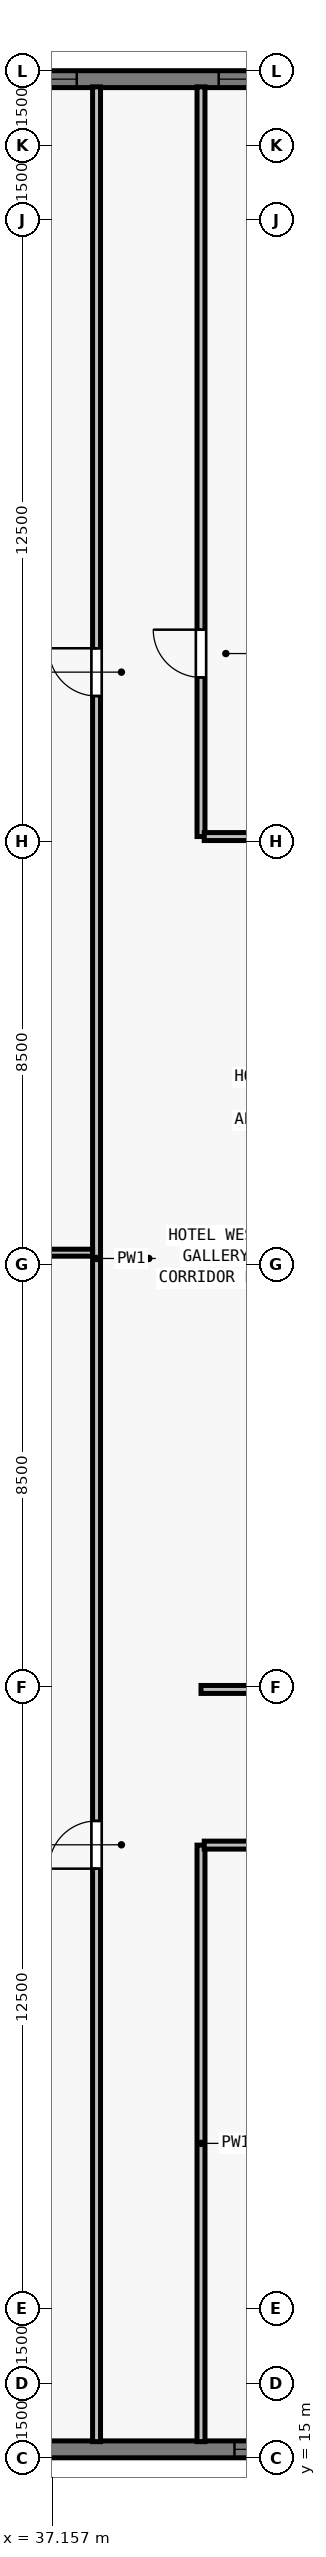
"""IFC4 building model, lengths in metres.
Left out: names, types, materials, properties, quantities, classifications, styles, units other than length and angle.
Written with IfcOpenShell. Run it as: python <this file> out.ifc"""

import sys

from ifc_helpers import new_model, si_unit, direction, frame, frame_2d, origin, place, context, subcontext, project, spatial, rectangle, extrude, element, fill, save


model = new_model("IFC4")
c1 = context("Model", 3, precision=1e-05, world=origin(), true_north=direction((0.0, 1.0)))
c2 = subcontext(c1, "Body", "Model", "MODEL_VIEW")
j1 = project(units=[si_unit("LENGTHUNIT", "METRE"), si_unit("PLANEANGLEUNIT", "RADIAN")], contexts=[c1])
p1 = place(None, origin())
s1 = spatial("IfcSite", under=j1, at=p1, CompositionType="ELEMENT")
p2 = place(p1, origin())
s2 = spatial("IfcBuilding", under=s1, at=p2, CompositionType="ELEMENT")
p3 = place(p2, frame((0.0, 0.0, 186.5)))
s3 = spatial("IfcBuildingStorey", under=s2, at=p3, CompositionType="ELEMENT", Elevation=186.5)
p4 = place(p3, frame((72.0, 15.17, 0.0), z_axis=(0.0, 0.0, 1.0), x_axis=(-1.0, 0.0, 0.0)))
e1 = element("IfcWall", 1, at=p4, inside=s3, PredefinedType="SOLIDWALL", context=c2, shape_type="SweptSolid", body=[
    extrude(rectangle(XDim=39.682, YDim=0.34, at=frame_2d((19.841, 0.0))), origin(), (0.0, 0.0, 1.0), 3.28),
])
p5 = place(p4, frame((11.859, 0.0, 0.8)))
e2 = element("IfcOpeningElement", 2, at=p5, cuts=e1, PredefinedType="OPENING", context=c2, shape_type="SweptSolid", body=[
    extrude(rectangle(XDim=1.75, YDim=1.66, at=frame_2d((0.875, 0.83))), frame((0.0, 0.18, 0.0), z_axis=(0.0, -1.0, 0.0), x_axis=(1.0, 0.0, 0.0)), (0.0, 0.0, 1.0), 0.36),
])
p6 = place(p4, frame((18.966, 0.0, 0.8)))
e3 = element("IfcOpeningElement", 3, at=p6, cuts=e1, PredefinedType="OPENING", context=c2, shape_type="SweptSolid", body=[
    extrude(rectangle(XDim=1.75, YDim=1.66, at=frame_2d((0.875, 0.83))), frame((0.0, 0.18, 0.0), z_axis=(0.0, -1.0, 0.0), x_axis=(1.0, 0.0, 0.0)), (0.0, 0.0, 1.0), 0.36),
])
p7 = place(p4, frame((22.27, 0.0, 0.8)))
e4 = element("IfcOpeningElement", 4, at=p7, cuts=e1, PredefinedType="OPENING", context=c2, shape_type="SweptSolid", body=[
    extrude(rectangle(XDim=1.35, YDim=1.66, at=frame_2d((0.675, 0.83))), frame((0.0, 0.18, 0.0), z_axis=(0.0, -1.0, 0.0), x_axis=(1.0, 0.0, 0.0)), (0.0, 0.0, 1.0), 0.36),
])
p8 = place(p4, frame((26.073, 0.0, 0.8)))
e5 = element("IfcOpeningElement", 5, at=p8, cuts=e1, PredefinedType="OPENING", context=c2, shape_type="SweptSolid", body=[
    extrude(rectangle(XDim=1.75, YDim=1.66, at=frame_2d((0.875, 0.83))), frame((0.0, 0.18, 0.0), z_axis=(0.0, -1.0, 0.0), x_axis=(1.0, 0.0, 0.0)), (0.0, 0.0, 1.0), 0.36),
])
p9 = place(p4, frame((29.827, 0.0, 0.8)))
e6 = element("IfcOpeningElement", 6, at=p9, cuts=e1, PredefinedType="OPENING", context=c2, shape_type="SweptSolid", body=[
    extrude(rectangle(XDim=1.35, YDim=1.66, at=frame_2d((0.675, 0.83))), frame((0.0, 0.18, 0.0), z_axis=(0.0, -1.0, 0.0), x_axis=(1.0, 0.0, 0.0)), (0.0, 0.0, 1.0), 0.36),
])
p10 = place(p3, frame((32.0, 62.83, 0.0), z_axis=(0.0, 0.0, 1.0), x_axis=(1.0, 0.0, 0.0)))
e7 = element("IfcWall", 7, at=p10, inside=s3, PredefinedType="SOLIDWALL", context=c2, shape_type="SweptSolid", body=[
    extrude(rectangle(XDim=39.682, YDim=0.34, at=frame_2d((19.841, 0.0))), origin(), (0.0, 0.0, 1.0), 3.28),
])
p11 = place(p10, frame((3.902, 0.0, 0.8)))
e8 = element("IfcOpeningElement", 8, at=p11, cuts=e7, PredefinedType="OPENING", context=c2, shape_type="SweptSolid", body=[
    extrude(rectangle(XDim=1.75, YDim=1.66, at=frame_2d((0.875, 0.83))), frame((0.0, 0.18, 0.0), z_axis=(0.0, -1.0, 0.0), x_axis=(1.0, 0.0, 0.0)), (0.0, 0.0, 1.0), 0.36),
])
p12 = place(p10, frame((8.505, 0.0, 0.8)))
e9 = element("IfcOpeningElement", 9, at=p12, cuts=e7, PredefinedType="OPENING", context=c2, shape_type="SweptSolid", body=[
    extrude(rectangle(XDim=1.35, YDim=1.66, at=frame_2d((0.675, 0.83))), frame((0.0, 0.18, 0.0), z_axis=(0.0, -1.0, 0.0), x_axis=(1.0, 0.0, 0.0)), (0.0, 0.0, 1.0), 0.36),
])
p13 = place(p10, frame((11.859, 0.0, 0.8)))
e10 = element("IfcOpeningElement", 10, at=p13, cuts=e7, PredefinedType="OPENING", context=c2, shape_type="SweptSolid", body=[
    extrude(rectangle(XDim=1.75, YDim=1.66, at=frame_2d((0.875, 0.83))), frame((0.0, 0.18, 0.0), z_axis=(0.0, -1.0, 0.0), x_axis=(1.0, 0.0, 0.0)), (0.0, 0.0, 1.0), 0.36),
])
p14 = place(p10, frame((16.062, 0.0, 0.8)))
e11 = element("IfcOpeningElement", 11, at=p14, cuts=e7, PredefinedType="OPENING", context=c2, shape_type="SweptSolid", body=[
    extrude(rectangle(XDim=1.35, YDim=1.66, at=frame_2d((0.675, 0.83))), frame((0.0, 0.18, 0.0), z_axis=(0.0, -1.0, 0.0), x_axis=(1.0, 0.0, 0.0)), (0.0, 0.0, 1.0), 0.36),
])
p15 = place(p10, frame((17.716, 0.0, 0.8)))
e12 = element("IfcOpeningElement", 12, at=p15, cuts=e7, PredefinedType="OPENING", context=c2, shape_type="SweptSolid", body=[
    extrude(rectangle(XDim=1.75, YDim=1.66, at=frame_2d((0.875, 0.83))), frame((0.0, 0.18, 0.0), z_axis=(0.0, -1.0, 0.0), x_axis=(1.0, 0.0, 0.0)), (0.0, 0.0, 1.0), 0.36),
])
p16 = place(p10, frame((22.719, 0.0, 0.8)))
e13 = element("IfcOpeningElement", 13, at=p16, cuts=e7, PredefinedType="OPENING", context=c2, shape_type="SweptSolid", body=[
    extrude(rectangle(XDim=1.35, YDim=1.66, at=frame_2d((0.675, 0.83))), frame((0.0, 0.18, 0.0), z_axis=(0.0, -1.0, 0.0), x_axis=(1.0, 0.0, 0.0)), (0.0, 0.0, 1.0), 0.36),
])
p17 = place(p10, frame((26.073, 0.0, 0.8)))
e14 = element("IfcOpeningElement", 14, at=p17, cuts=e7, PredefinedType="OPENING", context=c2, shape_type="SweptSolid", body=[
    extrude(rectangle(XDim=1.75, YDim=1.66, at=frame_2d((0.875, 0.83))), frame((0.0, 0.18, 0.0), z_axis=(0.0, -1.0, 0.0), x_axis=(1.0, 0.0, 0.0)), (0.0, 0.0, 1.0), 0.36),
])
p18 = place(p10, frame((30.677, 0.0, 0.8)))
e15 = element("IfcOpeningElement", 15, at=p18, cuts=e7, PredefinedType="OPENING", context=c2, shape_type="SweptSolid", body=[
    extrude(rectangle(XDim=1.35, YDim=1.66, at=frame_2d((0.675, 0.83))), frame((0.0, 0.18, 0.0), z_axis=(0.0, -1.0, 0.0), x_axis=(1.0, 0.0, 0.0)), (0.0, 0.0, 1.0), 0.36),
])
p19 = place(p10, frame((33.18, 0.0, 0.8)))
e16 = element("IfcOpeningElement", 16, at=p19, cuts=e7, PredefinedType="OPENING", context=c2, shape_type="SweptSolid", body=[
    extrude(rectangle(XDim=1.75, YDim=1.66, at=frame_2d((0.875, 0.83))), frame((0.0, 0.18, 0.0), z_axis=(0.0, -1.0, 0.0), x_axis=(1.0, 0.0, 0.0)), (0.0, 0.0, 1.0), 0.36),
])
p20 = place(p3, frame((38.05, 15.325, 0.0), z_axis=(0.0, 0.0, 1.0), x_axis=(0.0, 1.0, 0.0)))
e17 = element("IfcWall", 17, at=p20, inside=s3, PredefinedType="PARTITIONING", context=c2, shape_type="SweptSolid", body=[
    extrude(rectangle(XDim=47.35, YDim=0.16, at=frame_2d((23.675, 0.0))), origin(), (0.0, 0.0, 1.0), 2.555),
])
p21 = place(p20, frame((11.521, 0.0, 0.0)))
e18 = element("IfcOpeningElement", 18, at=p21, cuts=e17, PredefinedType="OPENING", context=c2, shape_type="SweptSolid", body=[
    extrude(rectangle(XDim=0.96, YDim=2.12, at=frame_2d((0.48, 1.06))), frame((0.0, 0.09, 0.0), z_axis=(0.0, -1.0, 0.0), x_axis=(1.0, 0.0, 0.0)), (0.0, 0.0, 1.0), 0.18),
])
p22 = place(p20, frame((35.101, 0.0, 0.0)))
e19 = element("IfcOpeningElement", 19, at=p22, cuts=e17, PredefinedType="OPENING", context=c2, shape_type="SweptSolid", body=[
    extrude(rectangle(XDim=0.96, YDim=2.12, at=frame_2d((0.48, 1.06))), frame((0.0, 0.09, 0.0), z_axis=(0.0, -1.0, 0.0), x_axis=(1.0, 0.0, 0.0)), (0.0, 0.0, 1.0), 0.18),
])
p23 = place(p3, frame((40.15, 15.325, 0.0), z_axis=(0.0, 0.0, 1.0), x_axis=(0.0, 1.0, 0.0)))
e20 = element("IfcWall", 20, at=p23, inside=s3, PredefinedType="PARTITIONING", context=c2, shape_type="SweptSolid", body=[
    extrude(rectangle(XDim=11.995, YDim=0.16, at=frame_2d((5.998, 0.0))), origin(), (0.0, 0.0, 1.0), 2.555),
])
p24 = place(p3, frame((40.15, 47.6, 0.0), z_axis=(0.0, 0.0, 1.0), x_axis=(0.0, 1.0, 0.0)))
e21 = element("IfcWall", 21, at=p24, inside=s3, PredefinedType="PARTITIONING", context=c2, shape_type="SweptSolid", body=[
    extrude(rectangle(XDim=15.075, YDim=0.16, at=frame_2d((7.538, 0.0))), origin(), (0.0, 0.0, 1.0), 2.555),
])
p25 = place(p24, frame((3.2, 0.0, 0.0)))
e22 = element("IfcOpeningElement", 22, at=p25, cuts=e21, PredefinedType="OPENING", context=c2, shape_type="SweptSolid", body=[
    extrude(rectangle(XDim=0.96, YDim=2.12, at=frame_2d((0.48, 1.06))), frame((0.0, 0.09, 0.0), z_axis=(0.0, -1.0, 0.0), x_axis=(1.0, 0.0, 0.0)), (0.0, 0.0, 1.0), 0.18),
])
p26 = place(p3, frame((40.15, 30.45, 0.0), z_axis=(0.0, 0.0, 1.0), x_axis=(1.0, 0.0, 0.0)))
e23 = element("IfcWall", 23, at=p26, inside=s3, PredefinedType="PARTITIONING", context=c2, shape_type="SweptSolid", body=[
    extrude(rectangle(XDim=3.085, YDim=0.16, at=frame_2d((1.542, 0.0))), origin(), (0.0, 0.0, 1.0), 3.28),
])
p27 = place(p3, frame((40.215, 47.6, 0.0), z_axis=(0.0, 0.0, 1.0), x_axis=(1.0, 0.0, 0.0)))
e24 = element("IfcWall", 24, at=p27, inside=s3, PredefinedType="PARTITIONING", context=c2, shape_type="SweptSolid", body=[
    extrude(rectangle(XDim=3.02, YDim=0.16, at=frame_2d((1.51, 0.0))), origin(), (0.0, 0.0, 1.0), 3.28),
])
p28 = place(p3, frame((40.215, 27.32, 0.0), z_axis=(0.0, 0.0, 1.0), x_axis=(1.0, 0.0, 0.0)))
e25 = element("IfcWall", 25, at=p28, inside=s3, PredefinedType="PARTITIONING", context=c2, shape_type="SweptSolid", body=[
    extrude(rectangle(XDim=22.07, YDim=0.16, at=frame_2d((11.035, 0.0))), origin(), (0.0, 0.0, 1.0), 3.28),
])
p29 = place(p28, frame((3.587, 0.0, 0.0)))
e26 = element("IfcOpeningElement", 26, at=p29, cuts=e25, PredefinedType="OPENING", context=c2, shape_type="SweptSolid", body=[
    extrude(rectangle(XDim=0.96, YDim=2.12, at=frame_2d((0.48, 1.06))), frame((0.0, 0.09, 0.0), z_axis=(0.0, -1.0, 0.0), x_axis=(1.0, 0.0, 0.0)), (0.0, 0.0, 1.0), 0.18),
])
p30 = place(p28, frame((10.61, 0.0, 0.0)))
e27 = element("IfcOpeningElement", 27, at=p30, cuts=e25, PredefinedType="OPENING", context=c2, shape_type="SweptSolid", body=[
    extrude(rectangle(XDim=0.96, YDim=2.12, at=frame_2d((0.48, 1.06))), frame((0.0, 0.09, 0.0), z_axis=(0.0, -1.0, 0.0), x_axis=(1.0, 0.0, 0.0)), (0.0, 0.0, 1.0), 0.18),
])
p31 = place(p28, frame((17.578, 0.0, 0.0)))
e28 = element("IfcOpeningElement", 28, at=p31, cuts=e25, PredefinedType="OPENING", context=c2, shape_type="SweptSolid", body=[
    extrude(rectangle(XDim=0.96, YDim=2.12, at=frame_2d((0.48, 1.06))), frame((0.0, 0.09, 0.0), z_axis=(0.0, -1.0, 0.0), x_axis=(1.0, 0.0, 0.0)), (0.0, 0.0, 1.0), 0.18),
])
p32 = place(p3, frame((28.42, 39.232, 0.0), z_axis=(0.0, 0.0, 1.0), x_axis=(1.0, 0.0, 0.0)))
e29 = element("IfcWall", 29, at=p32, inside=s3, PredefinedType="PARTITIONING", context=c2, shape_type="SweptSolid", body=[
    extrude(rectangle(XDim=9.55, YDim=0.14, at=frame_2d((4.775, 0.0))), origin(), (0.0, 0.0, 1.0), 2.896),
])
p33 = place(p9, origin())
e30 = element("IfcWindow", 30, at=p33, inside=s3, PartitioningType="SINGLE_PANEL", PredefinedType="WINDOW", context=c2, shape_type="SweptSolid", body=[
    extrude(rectangle(XDim=1.35, YDim=1.66, at=frame_2d((0.675, 0.83))), frame((0.0, -0.05, 0.0), z_axis=(0.0, -1.0, 0.0), x_axis=(1.0, 0.0, 0.0)), (0.0, 0.0, 1.0), 0.06),
])
fill(e6, e30)
p34 = place(p11, origin())
e31 = element("IfcWindow", 31, at=p34, inside=s3, PartitioningType="SINGLE_PANEL", PredefinedType="WINDOW", context=c2, shape_type="SweptSolid", body=[
    extrude(rectangle(XDim=1.75, YDim=1.66, at=frame_2d((0.875, 0.83))), frame((0.0, -0.05, 0.0), z_axis=(0.0, -1.0, 0.0), x_axis=(1.0, 0.0, 0.0)), (0.0, 0.0, 1.0), 0.06),
])
fill(e8, e31)
p35 = place(p12, origin())
e32 = element("IfcWindow", 32, at=p35, inside=s3, PartitioningType="SINGLE_PANEL", PredefinedType="WINDOW", context=c2, shape_type="SweptSolid", body=[
    extrude(rectangle(XDim=1.35, YDim=1.66, at=frame_2d((0.675, 0.83))), frame((0.0, -0.05, 0.0), z_axis=(0.0, -1.0, 0.0), x_axis=(1.0, 0.0, 0.0)), (0.0, 0.0, 1.0), 0.06),
])
fill(e9, e32)
p36 = place(p25, origin())
e33 = element("IfcDoor", 33, at=p36, inside=s3, OperationType="SINGLE_SWING_RIGHT", PredefinedType="DOOR", context=c2, shape_type="SweptSolid", body=[
    extrude(rectangle(XDim=0.96, YDim=2.12, at=frame_2d((0.48, 1.06))), frame((0.0, 0.025, 0.0), z_axis=(0.0, -1.0, 0.0), x_axis=(1.0, 0.0, 0.0)), (0.0, 0.0, 1.0), 0.05),
])
fill(e22, e33)
p37 = place(p21, origin())
e34 = element("IfcDoor", 34, at=p37, inside=s3, OperationType="SINGLE_SWING_LEFT", PredefinedType="DOOR", context=c2, shape_type="SweptSolid", body=[
    extrude(rectangle(XDim=0.96, YDim=2.12, at=frame_2d((0.48, 1.06))), frame((0.0, 0.025, 0.0), z_axis=(0.0, -1.0, 0.0), x_axis=(1.0, 0.0, 0.0)), (0.0, 0.0, 1.0), 0.05),
])
fill(e18, e34)
p38 = place(p22, origin())
e35 = element("IfcDoor", 35, at=p38, inside=s3, OperationType="SINGLE_SWING_RIGHT", PredefinedType="DOOR", context=c2, shape_type="SweptSolid", body=[
    extrude(rectangle(XDim=0.96, YDim=2.12, at=frame_2d((0.48, 1.06))), frame((0.0, 0.025, 0.0), z_axis=(0.0, -1.0, 0.0), x_axis=(1.0, 0.0, 0.0)), (0.0, 0.0, 1.0), 0.05),
])
fill(e19, e35)
save(model, sys.argv[1])
